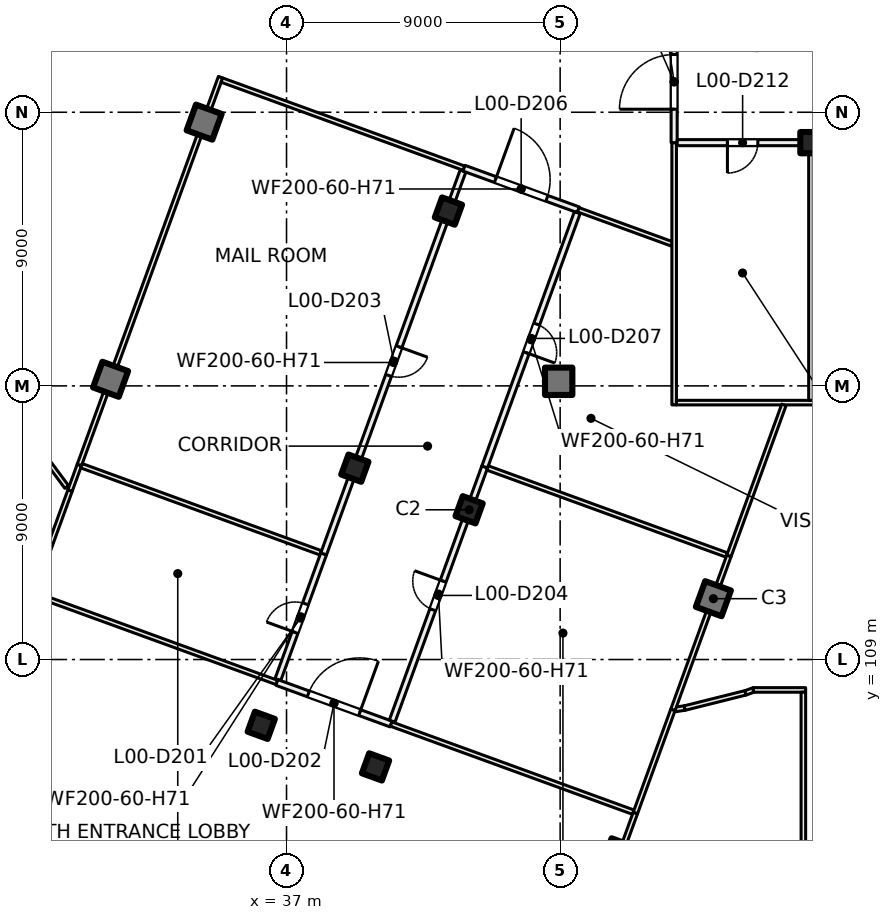
"""IFC4 building model, lengths in metres.
Left out: names, types, materials, properties, quantities, classifications, styles, units other than length and angle.
Written with IfcOpenShell. Run it as: python <this file> out.ifc"""

import sys

from ifc_helpers import new_model, si_unit, direction, frame, frame_2d, origin, origin_2d, place, context, subcontext, project, spatial, rectangle, extrude, element, fill, save


model = new_model("IFC4")
c1 = context("Model", 3, precision=1e-05, world=origin(), true_north=direction((0.0, 1.0)))
c2 = subcontext(c1, "Body", "Model", "MODEL_VIEW")
j1 = project(units=[si_unit("LENGTHUNIT", "METRE"), si_unit("PLANEANGLEUNIT", "RADIAN")], contexts=[c1])
p1 = place(None, origin())
s1 = spatial("IfcSite", under=j1, at=p1, CompositionType="ELEMENT")
p2 = place(p1, origin())
s2 = spatial("IfcBuilding", under=s1, at=p2, CompositionType="ELEMENT")
p3 = place(p2, origin())
s3 = spatial("IfcBuildingStorey", under=s2, at=p3, CompositionType="ELEMENT", Elevation=0.0)
p4 = place(p3, frame((54.25, 126.0, 0.0), z_axis=(0.0, 0.0, 1.0), x_axis=(1.0, 0.0, 0.0)))
e1 = element("IfcColumn", 1, at=p4, inside=s3, PredefinedType="COLUMN", context=c2, shape_type="SweptSolid", body=[
    extrude(rectangle(XDim=0.7, YDim=0.7, at=origin_2d()), origin(), (0.0, 0.0, 1.0), 7.5),
])
p5 = place(p3, frame((45.952, 118.152, 0.0), z_axis=(0.0, 0.0, 1.0), x_axis=(1.0, 0.0, 0.0)))
e2 = element("IfcColumn", 2, at=p5, inside=s3, PredefinedType="COLUMN", context=c2, shape_type="SweptSolid", body=[
    extrude(rectangle(XDim=0.9, YDim=0.9, at=origin_2d()), origin(), (0.0, 0.0, 1.0), 7.5),
])
for number, where, z_axis, x_axis in (
    (3, (43.006, 113.925, 0.0), (0.0, 0.0, 1.0), (-0.342, -0.94, 0.0)),
    (4, (39.927, 105.468, 0.0), (0.0, 0.0, 1.0), (-0.342, -0.94, 0.0)),
    (5, (42.325, 123.751, 0.0), (0.0, 0.0, 1.0), (-0.342, -0.94, 0.0)),
    (6, (39.247, 115.293, 0.0), (0.0, 0.0, 1.0), (-0.342, -0.94, 0.0)),
    (7, (36.169, 106.836, 0.0), (0.0, 0.0, 1.0), (-0.342, -0.94, 0.0)),
):
    element("IfcColumn", number, at=place(p3, frame(where, z_axis=z_axis, x_axis=x_axis)), inside=s3, PredefinedType="COLUMN", context=c2, shape_type="SweptSolid", body=[
        extrude(rectangle(XDim=0.7, YDim=0.7, at=origin_2d()), origin(), (0.0, 0.0, 1.0), 7.5),
    ])
for number, where, z_axis, x_axis in (
    (8, (51.04, 111.001, 0.0), (0.0, 0.0, 1.0), (-0.342, -0.94, 0.0)),
    (9, (47.962, 102.544, 0.0), (0.0, 0.0, 1.0), (-0.342, -0.94, 0.0)),
    (10, (34.291, 126.675, 0.0), (0.0, 0.0, 1.0), (-0.342, -0.94, 0.0)),
    (11, (31.212, 118.218, 0.0), (0.0, 0.0, 1.0), (-0.342, -0.94, 0.0)),
):
    element("IfcColumn", number, at=place(p3, frame(where, z_axis=z_axis, x_axis=x_axis)), inside=s3, PredefinedType="COLUMN", context=c2, shape_type="SweptSolid", body=[
        extrude(rectangle(XDim=0.9, YDim=0.9, at=origin_2d()), origin(), (0.0, 0.0, 1.0), 7.5),
    ])
p6 = place(p3, frame((28.537, 116.336, 0.0), z_axis=(0.0, 0.0, 1.0), x_axis=(0.595741297031, -0.80317638599, 0.0)))
e12 = element("IfcWall", 12, at=p6, inside=s3, PredefinedType="PARTITIONING", context=c2, shape_type="SweptSolid", body=[
    extrude(rectangle(XDim=2.068, YDim=0.15, at=frame_2d((1.034, 0.0))), origin(), (0.0, 0.0, 1.0), 7.1),
])
p7 = place(p3, frame((28.647, 111.17, 0.0), z_axis=(0.0, 0.0, 1.0), x_axis=(0.341993373756, 0.939702363681, 0.0)))
e13 = element("IfcWall", 13, at=p7, inside=s3, PredefinedType="PARTITIONING", context=c2, shape_type="SweptSolid", body=[
    extrude(rectangle(XDim=3.602, YDim=0.15, at=frame_2d((1.801, 0.0))), origin(), (0.0, 0.0, 1.0), 7.1),
])
p8 = place(p3, frame((28.717, 111.144, 0.0), z_axis=(0.0, 0.0, 1.0), x_axis=(0.939731172492, -0.341914204803, 0.0)))
e14 = element("IfcWall", 14, at=p8, inside=s3, PredefinedType="PARTITIONING", context=c2, shape_type="SweptSolid", body=[
    extrude(rectangle(XDim=8.476, YDim=0.15, at=frame_2d((4.238, 0.0))), origin(), (0.0, 0.0, 1.0), 7.1),
])
p9 = place(p3, frame((29.879, 114.555, 0.0), z_axis=(0.0, 0.0, 1.0), x_axis=(0.341961311006, 0.939714031914, 0.0)))
e15 = element("IfcWall", 15, at=p9, inside=s3, PredefinedType="PARTITIONING", context=c2, shape_type="SweptSolid", body=[
    extrude(rectangle(XDim=0.898, YDim=0.15, at=frame_2d((0.449, 0.0))), origin(), (0.0, 0.0, 1.0), 7.1),
])
p10 = place(p3, frame((30.186, 115.399, 0.0), z_axis=(0.0, 0.0, 1.0), x_axis=(0.342121388632, 0.939655764331, 0.0)))
e16 = element("IfcWall", 16, at=p10, inside=s3, PredefinedType="PARTITIONING", context=c2, shape_type="SweptSolid", body=[
    extrude(rectangle(XDim=13.574, YDim=0.15, at=frame_2d((6.787, 0.0))), origin(), (0.0, 0.0, 1.0), 7.1),
])
p11 = place(p3, frame((30.256, 115.373, 0.0), z_axis=(0.0, 0.0, 1.0), x_axis=(0.939683593483, -0.342044944618, 0.0)))
e17 = element("IfcWall", 17, at=p11, inside=s3, PredefinedType="PARTITIONING", context=c2, shape_type="SweptSolid", body=[
    extrude(rectangle(XDim=8.376, YDim=0.15, at=frame_2d((4.188, 0.0))), origin(), (0.0, 0.0, 1.0), 7.1),
])
p12 = place(p3, frame((34.874, 128.058, 0.0), z_axis=(0.0, 0.0, 1.0), x_axis=(0.939708443164, -0.341976668571, 0.0)))
e18 = element("IfcWall", 18, at=p12, inside=s3, PredefinedType="PARTITIONING", context=c2, shape_type="SweptSolid", body=[
    extrude(rectangle(XDim=8.475, YDim=0.15, at=frame_2d((4.237, 0.0))), origin(), (0.0, 0.0, 1.0), 7.1),
])
p13 = place(p3, frame((36.716, 108.34, 0.0), z_axis=(0.0, 0.0, 1.0), x_axis=(0.342063854115, 0.939676710208, 0.0)))
e19 = element("IfcWall", 19, at=p13, inside=s3, PredefinedType="PARTITIONING", context=c2, shape_type="SweptSolid", body=[
    extrude(rectangle(XDim=4.399, YDim=0.2, at=frame_2d((2.2, 0.0))), origin(), (0.0, 0.0, 1.0), 7.1),
])
p14 = place(p13, frame((1.652, 0.0, 0.0)))
e20 = element("IfcOpeningElement", 20, at=p14, cuts=e19, PredefinedType="OPENING", context=c2, shape_type="SweptSolid", body=[
    extrude(rectangle(XDim=1.0, YDim=2.1, at=frame_2d((0.5, 1.05))), frame((0.0, 0.11, 0.0), z_axis=(0.0, -1.0, 0.0), x_axis=(1.0, 0.0, 0.0)), (0.0, 0.0, 1.0), 0.22),
])
p15 = place(p3, frame((40.44, 106.878, 0.0), z_axis=(0.0, 0.0, 1.0), x_axis=(-0.939665029144, 0.342095941228, 0.0)))
e21 = element("IfcWall", 21, at=p15, inside=s3, PredefinedType="PARTITIONING", context=c2, shape_type="SweptSolid", body=[
    extrude(rectangle(XDim=3.999, YDim=0.2, at=frame_2d((2.0, 0.0))), origin(), (0.0, 0.0, 1.0), 7.1),
])
p16 = place(p15, frame((1.099, 0.0, 0.0)))
e22 = element("IfcOpeningElement", 22, at=p16, cuts=e21, PredefinedType="OPENING", context=c2, shape_type="SweptSolid", body=[
    extrude(rectangle(XDim=1.8, YDim=2.1, at=frame_2d((0.9, 1.05))), frame((0.0, 0.11, 0.0), z_axis=(0.0, -1.0, 0.0), x_axis=(1.0, 0.0, 0.0)), (0.0, 0.0, 1.0), 0.22),
])
p17 = place(p3, frame((38.221, 112.474, 0.0), z_axis=(0.0, 0.0, 1.0), x_axis=(0.342018071111, 0.939693375008, 0.0)))
e23 = element("IfcWall", 23, at=p17, inside=s3, PredefinedType="PARTITIONING", context=c2, shape_type="SweptSolid", body=[
    extrude(rectangle(XDim=13.4, YDim=0.2, at=frame_2d((6.7, 0.0))), origin(), (0.0, 0.0, 1.0), 7.1),
])
p18 = place(p17, frame((6.248, 0.0, 0.0)))
e24 = element("IfcOpeningElement", 24, at=p18, cuts=e23, PredefinedType="OPENING", context=c2, shape_type="SweptSolid", body=[
    extrude(rectangle(XDim=1.0, YDim=2.1, at=frame_2d((0.5, 1.05))), frame((0.0, 0.11, 0.0), z_axis=(0.0, -1.0, 0.0), x_axis=(1.0, 0.0, 0.0)), (0.0, 0.0, 1.0), 0.22),
])
p19 = place(p3, frame((43.519, 115.335, 0.0), z_axis=(0.0, 0.0, 1.0), x_axis=(-0.342121866134, -0.939655590476, 0.0)))
e25 = element("IfcWall", 25, at=p19, inside=s3, PredefinedType="PARTITIONING", context=c2, shape_type="SweptSolid", body=[
    extrude(rectangle(XDim=8.9, YDim=0.2, at=frame_2d((4.45, 0.0))), origin(), (0.0, 0.0, 1.0), 7.1),
])
p20 = place(p19, frame((3.998, 0.0, 0.0)))
e26 = element("IfcOpeningElement", 26, at=p20, cuts=e25, PredefinedType="OPENING", context=c2, shape_type="SweptSolid", body=[
    extrude(rectangle(XDim=1.0, YDim=2.1, at=frame_2d((0.5, 1.05))), frame((0.0, 0.11, 0.0), z_axis=(0.0, -1.0, 0.0), x_axis=(1.0, 0.0, 0.0)), (0.0, 0.0, 1.0), 0.22),
])
p21 = place(p3, frame((40.44, 106.878, 0.0), z_axis=(0.0, 0.0, 1.0), x_axis=(0.939697516706, -0.342006691597, 0.0)))
e27 = element("IfcWall", 27, at=p21, inside=s3, PredefinedType="PARTITIONING", context=c2, shape_type="SweptSolid", body=[
    extrude(rectangle(XDim=8.476, YDim=0.15, at=frame_2d((4.238, 0.0))), origin(), (0.0, 0.0, 1.0), 7.1),
])
p22 = place(p3, frame((42.838, 125.16, 0.0), z_axis=(0.0, 0.0, 1.0), x_axis=(0.939713209288, -0.341963571582, 0.0)))
e28 = element("IfcWall", 28, at=p22, inside=s3, PredefinedType="PARTITIONING", context=c2, shape_type="SweptSolid", body=[
    extrude(rectangle(XDim=4.0, YDim=0.2, at=frame_2d((2.0, 0.0))), origin(), (0.0, 0.0, 1.0), 7.1),
])
p23 = place(p22, frame((1.1, 0.0, 0.0)))
e29 = element("IfcOpeningElement", 29, at=p23, cuts=e28, PredefinedType="OPENING", context=c2, shape_type="SweptSolid", body=[
    extrude(rectangle(XDim=1.8, YDim=2.1, at=frame_2d((0.9, 1.05))), frame((0.0, 0.11, 0.0), z_axis=(0.0, -1.0, 0.0), x_axis=(1.0, 0.0, 0.0)), (0.0, 0.0, 1.0), 0.22),
])
p24 = place(p3, frame((46.563, 123.698, 0.0), z_axis=(0.0, 0.0, 1.0), x_axis=(-0.342024978895, -0.939690860768, 0.0)))
e30 = element("IfcWall", 30, at=p24, inside=s3, PredefinedType="PARTITIONING", context=c2, shape_type="SweptSolid", body=[
    extrude(rectangle(XDim=8.9, YDim=0.2, at=frame_2d((4.45, 0.0))), origin(), (0.0, 0.0, 1.0), 7.1),
])
p25 = place(p24, frame((3.902, 0.0, 0.0)))
e31 = element("IfcOpeningElement", 31, at=p25, cuts=e30, PredefinedType="OPENING", context=c2, shape_type="SweptSolid", body=[
    extrude(rectangle(XDim=1.0, YDim=2.1, at=frame_2d((0.5, 1.05))), frame((0.0, 0.11, 0.0), z_axis=(0.0, -1.0, 0.0), x_axis=(1.0, 0.0, 0.0)), (0.0, 0.0, 1.0), 0.22),
])
p26 = place(p3, frame((43.613, 115.301, 0.0), z_axis=(0.0, 0.0, 1.0), x_axis=(0.93970742794, -0.341979458265, 0.0)))
e32 = element("IfcWall", 32, at=p26, inside=s3, PredefinedType="PARTITIONING", context=c2, shape_type="SweptSolid", body=[
    extrude(rectangle(XDim=8.375, YDim=0.15, at=frame_2d((4.188, 0.0))), origin(), (0.0, 0.0, 1.0), 7.1),
])
p27 = place(p3, frame((46.337, 98.08, 0.0), z_axis=(0.0, 0.0, 1.0), x_axis=(0.342113136459, 0.939658768842, 0.0)))
e33 = element("IfcWall", 33, at=p27, inside=s3, PredefinedType="PARTITIONING", context=c2, shape_type="SweptSolid", body=[
    extrude(rectangle(XDim=6.25, YDim=0.15, at=frame_2d((3.125, 0.0))), origin(), (0.0, 0.0, 1.0), 7.1),
])
p28 = place(p3, frame((46.597, 123.792, 0.0), z_axis=(0.0, 0.0, 1.0), x_axis=(0.939619227089, -0.342221723572, 0.0)))
e34 = element("IfcWall", 34, at=p28, inside=s3, PredefinedType="PARTITIONING", context=c2, shape_type="SweptSolid", body=[
    extrude(rectangle(XDim=3.276, YDim=0.15, at=frame_2d((1.638, 0.0))), origin(), (0.0, 0.0, 1.0), 7.1),
])
p29 = place(p3, frame((48.475, 103.953, 0.0), z_axis=(0.0, 0.0, 1.0), x_axis=(0.341992779494, 0.939702579955, 0.0)))
e35 = element("IfcWall", 35, at=p29, inside=s3, PredefinedType="PARTITIONING", context=c2, shape_type="SweptSolid", body=[
    extrude(rectangle(XDim=3.611, YDim=0.15, at=frame_2d((1.805, 0.0))), origin(), (0.0, 0.0, 1.0), 7.1),
])
p30 = place(p3, frame((49.794, 107.359, 0.0), z_axis=(0.0, 0.0, 1.0), x_axis=(0.988901730308, 0.148571086668, 0.0)))
e36 = element("IfcWall", 36, at=p30, inside=s3, PredefinedType="PARTITIONING", context=c2, shape_type="SweptSolid", body=[
    extrude(rectangle(XDim=0.311, YDim=0.15, at=frame_2d((0.155, 0.0))), origin(), (0.0, 0.0, 1.0), 7.1),
])
p31 = place(p3, frame((49.71, 107.346, 0.0), z_axis=(0.0, 0.0, 1.0), x_axis=(0.341943087223, 0.939720663336, 0.0)))
e37 = element("IfcWall", 37, at=p31, inside=s3, PredefinedType="PARTITIONING", context=c2, shape_type="SweptSolid", body=[
    extrude(rectangle(XDim=5.39, YDim=0.15, at=frame_2d((2.695, 0.0))), origin(), (0.0, 0.0, 1.0), 7.1),
])
p32 = place(p3, frame((49.75, 117.375, 0.0), z_axis=(0.0, 0.0, 1.0), x_axis=(0.0, 1.0, 0.0)))
e38 = element("IfcWall", 38, at=p32, inside=s3, PredefinedType="PARTITIONING", context=c2, shape_type="SweptSolid", body=[
    extrude(rectangle(XDim=8.625, YDim=0.15, at=frame_2d((4.312, 0.0))), origin(), (0.0, 0.0, 1.0), 7.1),
])
p33 = place(p3, frame((49.825, 117.45, 0.0), z_axis=(0.0, 0.0, 1.0), x_axis=(1.0, 0.0, 0.0)))
e39 = element("IfcWall", 39, at=p33, inside=s3, PredefinedType="PARTITIONING", context=c2, shape_type="SweptSolid", body=[
    extrude(rectangle(XDim=17.925, YDim=0.15, at=frame_2d((8.962, 0.0))), origin(), (0.0, 0.0, 1.0), 7.1),
])
p34 = place(p3, frame((49.75, 126.0, 0.0), z_axis=(0.0, 0.0, 1.0), x_axis=(0.0, 1.0, 0.0)))
e40 = element("IfcWall", 40, at=p34, inside=s3, PredefinedType="PARTITIONING", context=c2, shape_type="SweptSolid", body=[
    extrude(rectangle(XDim=4.0, YDim=0.2, at=frame_2d((2.0, 0.0))), origin(), (0.0, 0.0, 1.0), 7.1),
])
p35 = place(p34, frame((1.1, 0.0, 0.0)))
e41 = element("IfcOpeningElement", 41, at=p35, cuts=e40, PredefinedType="OPENING", context=c2, shape_type="SweptSolid", body=[
    extrude(rectangle(XDim=1.8, YDim=2.1, at=frame_2d((0.9, 1.05))), frame((0.0, 0.11, 0.0), z_axis=(0.0, -1.0, 0.0), x_axis=(1.0, 0.0, 0.0)), (0.0, 0.0, 1.0), 0.22),
])
p36 = place(p3, frame((67.65, 126.0, 0.0), z_axis=(0.0, 0.0, 1.0), x_axis=(-1.0, 0.0, 0.0)))
e42 = element("IfcWall", 42, at=p36, inside=s3, PredefinedType="PARTITIONING", context=c2, shape_type="SweptSolid", body=[
    extrude(rectangle(XDim=17.8, YDim=0.2, at=frame_2d((8.9, 0.0))), origin(), (0.0, 0.0, 1.0), 7.1),
])
p37 = place(p36, frame((15.148, 0.0, 0.0)))
e43 = element("IfcOpeningElement", 43, at=p37, cuts=e42, PredefinedType="OPENING", context=c2, shape_type="SweptSolid", body=[
    extrude(rectangle(XDim=1.0, YDim=2.1, at=frame_2d((0.5, 1.05))), frame((0.0, 0.11, 0.0), z_axis=(0.0, -1.0, 0.0), x_axis=(1.0, 0.0, 0.0)), (0.0, 0.0, 1.0), 0.22),
])
p38 = place(p36, frame((6.152, 0.0, 0.0)))
e44 = element("IfcOpeningElement", 44, at=p38, cuts=e42, PredefinedType="OPENING", context=c2, shape_type="SweptSolid", body=[
    extrude(rectangle(XDim=1.0, YDim=2.1, at=frame_2d((0.5, 1.05))), frame((0.0, 0.11, 0.0), z_axis=(0.0, -1.0, 0.0), x_axis=(1.0, 0.0, 0.0)), (0.0, 0.0, 1.0), 0.22),
])
p39 = place(p3, frame((50.093, 107.403, 0.0), z_axis=(0.0, 0.0, 1.0), x_axis=(0.970121672102, 0.24261892201, 0.0)))
e45 = element("IfcWall", 45, at=p39, inside=s3, PredefinedType="PARTITIONING", context=c2, shape_type="SweptSolid", body=[
    extrude(rectangle(XDim=2.069, YDim=0.15, at=frame_2d((1.034, 0.0))), origin(), (0.0, 0.0, 1.0), 7.1),
])
p40 = place(p3, frame((51.553, 112.411, 0.0), z_axis=(0.0, 0.0, 1.0), x_axis=(0.342076997639, 0.93967192556, 0.0)))
e46 = element("IfcWall", 46, at=p40, inside=s3, PredefinedType="PARTITIONING", context=c2, shape_type="SweptSolid", body=[
    extrude(rectangle(XDim=5.283, YDim=0.15, at=frame_2d((2.641, 0.0))), origin(), (0.0, 0.0, 1.0), 7.1),
])
p41 = place(p3, frame((52.093, 107.903, 0.0), z_axis=(0.0, 0.0, 1.0), x_axis=(0.941980718737, 0.335666986056, 0.0)))
e47 = element("IfcWall", 47, at=p41, inside=s3, PredefinedType="PARTITIONING", context=c2, shape_type="SweptSolid", body=[
    extrude(rectangle(XDim=0.3, YDim=0.15, at=frame_2d((0.15, 0.0))), origin(), (0.0, 0.0, 1.0), 7.1),
])
p42 = place(p3, frame((52.351, 108.0, 0.0), z_axis=(0.0, 0.0, 1.0), x_axis=(1.0, 0.0, 0.0)))
e48 = element("IfcWall", 48, at=p42, inside=s3, PredefinedType="PARTITIONING", context=c2, shape_type="SweptSolid", body=[
    extrude(rectangle(XDim=1.724, YDim=0.15, at=frame_2d((0.862, 0.0))), origin(), (0.0, 0.0, 1.0), 7.1),
])
p43 = place(p3, frame((54.0, 94.857, 0.0), z_axis=(0.0, 0.0, 1.0), x_axis=(0.0, 1.0, 0.0)))
e49 = element("IfcWall", 49, at=p43, inside=s3, PredefinedType="PARTITIONING", context=c2, shape_type="SweptSolid", body=[
    extrude(rectangle(XDim=13.068, YDim=0.15, at=frame_2d((6.534, 0.0))), origin(), (0.0, 0.0, 1.0), 7.1),
])
p44 = place(p3, frame((54.0, 94.428, 0.0), z_axis=(0.0, 0.0, 1.0), x_axis=(0.342028064794, 0.939689737569, 0.0)))
e50 = element("IfcWall", 50, at=p44, inside=s3, PredefinedType="PARTITIONING", context=c2, shape_type="SweptSolid", body=[
    extrude(rectangle(XDim=14.443, YDim=0.3, at=frame_2d((7.222, 0.0))), origin(), (0.0, 0.0, 1.0), 11.1),
])
p45 = place(p3, frame((54.25, 117.525, 0.0), z_axis=(0.0, 0.0, 1.0), x_axis=(0.0, 1.0, 0.0)))
e51 = element("IfcWall", 51, at=p45, inside=s3, PredefinedType="PARTITIONING", context=c2, shape_type="SweptSolid", body=[
    extrude(rectangle(XDim=8.375, YDim=0.15, at=frame_2d((4.188, 0.0))), origin(), (0.0, 0.0, 1.0), 7.1),
])
p46 = place(p14, origin())
e52 = element("IfcDoor", 52, at=p46, inside=s3, OperationType="SINGLE_SWING_LEFT", PredefinedType="DOOR", context=c2, shape_type="SweptSolid", body=[
    extrude(rectangle(XDim=1.0, YDim=2.1, at=frame_2d((0.5, 1.05))), frame((0.0, 0.025, 0.0), z_axis=(0.0, -1.0, 0.0), x_axis=(1.0, 0.0, 0.0)), (0.0, 0.0, 1.0), 0.05),
])
fill(e20, e52)
p47 = place(p16, origin())
e53 = element("IfcDoor", 53, at=p47, inside=s3, OperationType="DOUBLE_DOOR_SINGLE_SWING", PredefinedType="DOOR", context=c2, shape_type="SweptSolid", body=[
    extrude(rectangle(XDim=1.8, YDim=2.1, at=frame_2d((0.9, 1.05))), frame((0.0, 0.025, 0.0), z_axis=(0.0, -1.0, 0.0), x_axis=(1.0, 0.0, 0.0)), (0.0, 0.0, 1.0), 0.05),
])
fill(e22, e53)
p48 = place(p18, origin())
e54 = element("IfcDoor", 54, at=p48, inside=s3, OperationType="SINGLE_SWING_RIGHT", PredefinedType="DOOR", context=c2, shape_type="SweptSolid", body=[
    extrude(rectangle(XDim=1.0, YDim=2.1, at=frame_2d((0.5, 1.05))), frame((0.0, 0.025, 0.0), z_axis=(0.0, -1.0, 0.0), x_axis=(1.0, 0.0, 0.0)), (0.0, 0.0, 1.0), 0.05),
])
fill(e24, e54)
p49 = place(p20, origin())
e55 = element("IfcDoor", 55, at=p49, inside=s3, OperationType="SINGLE_SWING_LEFT", PredefinedType="DOOR", context=c2, shape_type="SweptSolid", body=[
    extrude(rectangle(XDim=1.0, YDim=2.1, at=frame_2d((0.5, 1.05))), frame((0.0, 0.025, 0.0), z_axis=(0.0, -1.0, 0.0), x_axis=(1.0, 0.0, 0.0)), (0.0, 0.0, 1.0), 0.05),
])
fill(e26, e55)
p50 = place(p23, origin())
e56 = element("IfcDoor", 56, at=p50, inside=s3, OperationType="DOUBLE_DOOR_SINGLE_SWING", PredefinedType="DOOR", context=c2, shape_type="SweptSolid", body=[
    extrude(rectangle(XDim=1.8, YDim=2.1, at=frame_2d((0.9, 1.05))), frame((0.0, 0.025, 0.0), z_axis=(0.0, -1.0, 0.0), x_axis=(1.0, 0.0, 0.0)), (0.0, 0.0, 1.0), 0.05),
])
fill(e29, e56)
p51 = place(p25, origin())
e57 = element("IfcDoor", 57, at=p51, inside=s3, OperationType="SINGLE_SWING_RIGHT", PredefinedType="DOOR", context=c2, shape_type="SweptSolid", body=[
    extrude(rectangle(XDim=1.0, YDim=2.1, at=frame_2d((0.5, 1.05))), frame((0.0, 0.025, 0.0), z_axis=(0.0, -1.0, 0.0), x_axis=(1.0, 0.0, 0.0)), (0.0, 0.0, 1.0), 0.05),
])
fill(e31, e57)
p52 = place(p35, origin())
e58 = element("IfcDoor", 58, at=p52, inside=s3, OperationType="DOUBLE_DOOR_SINGLE_SWING", PredefinedType="DOOR", context=c2, shape_type="SweptSolid", body=[
    extrude(rectangle(XDim=1.8, YDim=2.1, at=frame_2d((0.9, 1.05))), frame((0.0, 0.025, 0.0), z_axis=(0.0, -1.0, 0.0), x_axis=(1.0, 0.0, 0.0)), (0.0, 0.0, 1.0), 0.05),
])
fill(e41, e58)
p53 = place(p37, origin())
e59 = element("IfcDoor", 59, at=p53, inside=s3, OperationType="SINGLE_SWING_RIGHT", PredefinedType="DOOR", context=c2, shape_type="SweptSolid", body=[
    extrude(rectangle(XDim=1.0, YDim=2.1, at=frame_2d((0.5, 1.05))), frame((0.0, 0.025, 0.0), z_axis=(0.0, -1.0, 0.0), x_axis=(1.0, 0.0, 0.0)), (0.0, 0.0, 1.0), 0.05),
])
fill(e43, e59)
save(model, sys.argv[1])
